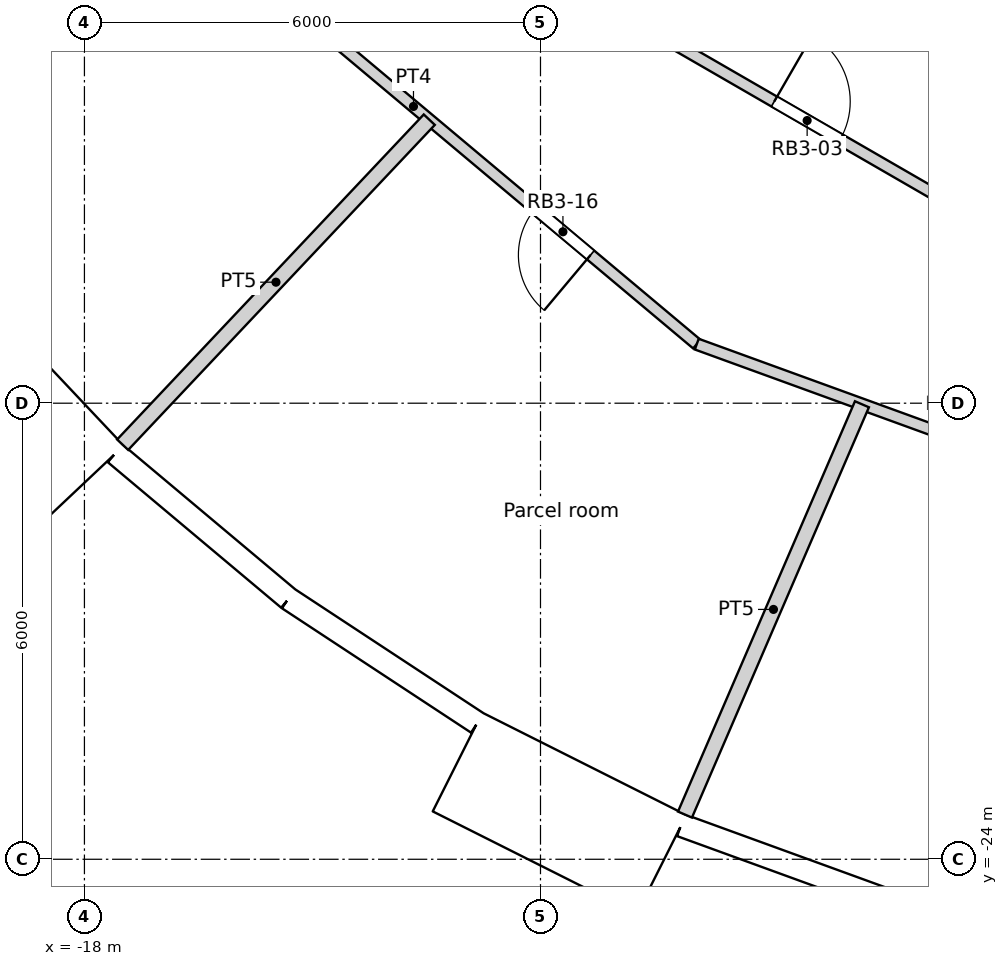
"""IFC4 building model, lengths in metres.
Left out: names, types, materials, properties, quantities, classifications, styles, units other than length and angle.
Written with IfcOpenShell. Run it as: python <this file> out.ifc"""

import sys

from ifc_helpers import new_model, si_unit, direction, frame, frame_2d, origin, origin_2d, place, context, subcontext, project, spatial, rectangle, circle, extrude, element, fill, save


model = new_model("IFC4")
c1 = context("Model", 3, precision=1e-05, world=origin(), true_north=direction((0.0, 1.0)))
c2 = subcontext(c1, "Body", "Model", "MODEL_VIEW")
j1 = project(units=[si_unit("LENGTHUNIT", "METRE"), si_unit("PLANEANGLEUNIT", "RADIAN")], contexts=[c1])
p1 = place(None, origin())
s1 = spatial("IfcSite", under=j1, at=p1, CompositionType="ELEMENT")
p2 = place(p1, origin())
s2 = spatial("IfcBuilding", under=s1, at=p2, CompositionType="ELEMENT")
p3 = place(p2, frame((0.0, 0.0, 147.6)))
s3 = spatial("IfcBuildingStorey", under=s2, at=p3, CompositionType="ELEMENT", Elevation=147.6)
for number, where, z_axis, x_axis in (
    (1, (-16.846, -17.855, 0.0), (0.0, 0.0, 1.0), (1.0, 0.0, 0.0)),
    (2, (-12.274, -21.259, 0.0), (0.0, 0.0, 1.0), (1.0, 0.0, 0.0)),
    (3, (-7.04, -23.516, 0.0), (0.0, 0.0, 1.0), (1.0, 0.0, 0.0)),
):
    element("IfcColumn", number, at=place(p3, frame(where, z_axis=z_axis, x_axis=x_axis)), inside=s3, PredefinedType="COLUMN", context=c2, shape_type="SweptSolid", body=[
        extrude(circle(Radius=0.6, at=origin_2d()), origin(), (0.0, 0.0, 1.0), 3.6),
    ])
for number, where, z_axis, x_axis in (
    (4, (-13.798, -12.802, 0.0), (0.0, 0.0, 1.0), (1.0, 0.0, 0.0)),
    (5, (-9.411, -16.301, 0.0), (0.0, 0.0, 1.0), (1.0, 0.0, 0.0)),
):
    element("IfcColumn", number, at=place(p3, frame(where, z_axis=z_axis, x_axis=x_axis)), inside=s3, PredefinedType="COLUMN", context=c2, shape_type="SweptSolid", body=[
        extrude(circle(Radius=0.65, at=origin_2d()), origin(), (0.0, 0.0, 1.0), 3.6),
    ])
p4 = place(p3, frame((-20.071, -16.874, -0.3), z_axis=(0.0, 0.0, 1.0), x_axis=(0.686217177108, -0.727396718334, 0.0)))
e6 = element("IfcWall", 6, at=p4, inside=s3, PredefinedType="ELEMENTEDWALL", context=c2, shape_type="SweptSolid", body=[
    extrude(rectangle(XDim=3.0, YDim=1.45, at=frame_2d((1.5, 0.0))), origin(), (0.0, 0.0, 1.0), 3.6),
])
p5 = place(p4, frame((1.5, 0.0, 1.85)))
e7 = element("IfcOpeningElement", 7, at=p5, cuts=e6, PredefinedType="OPENING", context=c2, shape_type="SweptSolid", body=[
    extrude(circle(Radius=0.9, at=origin_2d()), frame((0.0, 0.735, 0.0), z_axis=(0.0, -1.0, 0.0), x_axis=(1.0, 0.0, 0.0)), (0.0, 0.0, 1.0), 1.47),
])
p6 = place(p3, frame((-17.593, -18.661, 0.0), z_axis=(0.0, 0.0, 1.0), x_axis=(0.766008913364, -0.642829950023, 0.0)))
e8 = element("IfcWall", 8, at=p6, inside=s3, PredefinedType="SOLIDWALL", context=c2, shape_type="SweptSolid", body=[
    extrude(rectangle(XDim=2.973, YDim=0.3, at=frame_2d((1.486, 0.0))), origin(), (0.0, 0.0, 1.0), 3.3),
])
p7 = place(p6, frame((1.486, 0.0, 1.55)))
e9 = element("IfcOpeningElement", 9, at=p7, cuts=e8, PredefinedType="OPENING", context=c2, shape_type="SweptSolid", body=[
    extrude(circle(Radius=0.9, at=origin_2d()), frame((0.0, 0.16, 0.0), z_axis=(0.0, -1.0, 0.0), x_axis=(1.0, 0.0, 0.0)), (0.0, 0.0, 1.0), 0.32),
])
p8 = place(p3, frame((-15.316, -20.573, 0.0), z_axis=(0.0, 0.0, 1.0), x_axis=(0.835508361394, -0.54947773207, 0.0)))
e10 = element("IfcWall", 10, at=p8, inside=s3, PredefinedType="SOLIDWALL", context=c2, shape_type="SweptSolid", body=[
    extrude(rectangle(XDim=2.973, YDim=0.3, at=frame_2d((1.486, 0.0))), origin(), (0.0, 0.0, 1.0), 3.3),
])
p9 = place(p8, frame((1.486, 0.0, 1.55)))
e11 = element("IfcOpeningElement", 11, at=p9, cuts=e10, PredefinedType="OPENING", context=c2, shape_type="SweptSolid", body=[
    extrude(circle(Radius=0.9, at=origin_2d()), frame((0.0, 0.16, 0.0), z_axis=(0.0, -1.0, 0.0), x_axis=(1.0, 0.0, 0.0)), (0.0, 0.0, 1.0), 0.32),
])
p10 = place(p3, frame((-13.09, -22.721, -0.3), z_axis=(0.0, 0.0, 1.0), x_axis=(0.893628249713, -0.448807922518, 0.0)))
e12 = element("IfcWall", 12, at=p10, inside=s3, PredefinedType="ELEMENTEDWALL", context=c2, shape_type="SweptSolid", body=[
    extrude(rectangle(XDim=3.0, YDim=1.45, at=frame_2d((1.5, 0.0))), origin(), (0.0, 0.0, 1.0), 3.6),
])
p11 = place(p10, frame((1.5, 0.0, 1.85)))
e13 = element("IfcOpeningElement", 13, at=p11, cuts=e12, PredefinedType="OPENING", context=c2, shape_type="SweptSolid", body=[
    extrude(circle(Radius=0.9, at=origin_2d()), frame((0.0, 0.735, 0.0), z_axis=(0.0, -1.0, 0.0), x_axis=(1.0, 0.0, 0.0)), (0.0, 0.0, 1.0), 1.47),
])
p12 = place(p3, frame((-10.149, -23.553, 0.0), z_axis=(0.0, 0.0, 1.0), x_axis=(0.939690282133, -0.342026568652, 0.0)))
e14 = element("IfcWall", 14, at=p12, inside=s3, PredefinedType="SOLIDWALL", context=c2, shape_type="SweptSolid", body=[
    extrude(rectangle(XDim=2.973, YDim=0.3, at=frame_2d((1.486, 0.0))), origin(), (0.0, 0.0, 1.0), 3.3),
])
p13 = place(p12, frame((1.486, 0.0, 1.55)))
e15 = element("IfcOpeningElement", 15, at=p13, cuts=e14, PredefinedType="OPENING", context=c2, shape_type="SweptSolid", body=[
    extrude(circle(Radius=0.9, at=origin_2d()), frame((0.0, 0.16, 0.0), z_axis=(0.0, -1.0, 0.0), x_axis=(1.0, 0.0, 0.0)), (0.0, 0.0, 1.0), 0.32),
])
p14 = place(p3, frame((-15.235, -12.784, 0.0), z_axis=(0.0, 0.0, 1.0), x_axis=(0.766192104565, -0.642611592567, 0.0)))
e16 = element("IfcWall", 16, at=p14, inside=s3, PredefinedType="PARTITIONING", context=c2, shape_type="SweptSolid", body=[
    extrude(rectangle(XDim=6.906, YDim=0.15, at=frame_2d((3.453, 0.0))), origin(), (0.0, 0.0, 1.0), 3.3),
])
p15 = place(p14, frame((4.133, 0.0, 0.0)))
e17 = element("IfcOpeningElement", 17, at=p15, cuts=e16, PredefinedType="OPENING", context=c2, shape_type="SweptSolid", body=[
    extrude(rectangle(XDim=0.95, YDim=2.1, at=frame_2d((0.475, 1.05))), frame((0.0, 0.075, 0.0), z_axis=(0.0, -1.0, 0.0), x_axis=(1.0, 0.0, 0.0)), (0.0, 0.0, 1.0), 0.15),
])
p16 = place(p3, frame((-12.162, -12.162, 0.0), z_axis=(0.0, 0.0, 1.0), x_axis=(0.866004766557, -0.500035743023, 0.0)))
e18 = element("IfcWall", 18, at=p16, inside=s3, PredefinedType="PARTITIONING", context=c2, shape_type="SweptSolid", body=[
    extrude(rectangle(XDim=8.477, YDim=0.15, at=frame_2d((4.239, 0.0))), origin(), (0.0, 0.0, 1.0), 3.3),
])
p17 = place(p16, frame((3.738, 0.0, 0.0)))
e19 = element("IfcOpeningElement", 19, at=p17, cuts=e18, PredefinedType="OPENING", context=c2, shape_type="SweptSolid", body=[
    extrude(rectangle(XDim=1.0, YDim=2.04, at=frame_2d((0.5, 1.02))), frame((0.0, 0.075, 0.0), z_axis=(0.0, -1.0, 0.0), x_axis=(1.0, 0.0, 0.0)), (0.0, 0.0, 1.0), 0.15),
])
p18 = place(p3, frame((-9.944, -17.223, 0.0), z_axis=(0.0, 0.0, 1.0), x_axis=(0.939737689664, -0.341896292208, 0.0)))
e20 = element("IfcWall", 20, at=p18, inside=s3, PredefinedType="PARTITIONING", context=c2, shape_type="SweptSolid", body=[
    extrude(rectangle(XDim=6.908, YDim=0.15, at=frame_2d((3.454, 0.0))), origin(), (0.0, 0.0, 1.0), 3.3),
])
p19 = place(p3, frame((-17.497, -18.546, 0.0), z_axis=(0.0, 0.0, 1.0), x_axis=(0.6862502776, 0.72736549031, 0.0)))
e21 = element("IfcWall", 21, at=p19, inside=s3, PredefinedType="PARTITIONING", context=c2, shape_type="SweptSolid", body=[
    extrude(rectangle(XDim=5.879, YDim=0.2, at=frame_2d((2.939, 0.0))), origin(), (0.0, 0.0, 1.0), 3.3),
])
p20 = place(p3, frame((-10.099, -23.412, 0.0), z_axis=(0.0, 0.0, 1.0), x_axis=(0.39601833725, 0.918242602236, 0.0)))
e22 = element("IfcWall", 22, at=p20, inside=s3, PredefinedType="PARTITIONING", context=c2, shape_type="SweptSolid", body=[
    extrude(rectangle(XDim=5.879, YDim=0.2, at=frame_2d((2.939, 0.0))), origin(), (0.0, 0.0, 1.0), 3.3),
])
p21 = place(p5, origin())
e23 = element("IfcWindow", 23, at=p21, inside=s3, PartitioningType="SINGLE_PANEL", PredefinedType="WINDOW", context=c2, shape_type="SweptSolid", body=[
    extrude(circle(Radius=0.9, at=origin_2d()), frame((0.0, 0.695, 0.0), z_axis=(0.0, -1.0, 0.0), x_axis=(1.0, 0.0, 0.0)), (0.0, 0.0, 1.0), 0.1),
])
fill(e7, e23)
p22 = place(p7, origin())
e24 = element("IfcWindow", 24, at=p22, inside=s3, PartitioningType="SINGLE_PANEL", PredefinedType="WINDOW", context=c2, shape_type="SweptSolid", body=[
    extrude(circle(Radius=0.9, at=origin_2d()), frame((0.0, 0.12, 0.0), z_axis=(0.0, -1.0, 0.0), x_axis=(1.0, 0.0, 0.0)), (0.0, 0.0, 1.0), 0.1),
])
fill(e9, e24)
p23 = place(p9, origin())
e25 = element("IfcWindow", 25, at=p23, inside=s3, PartitioningType="SINGLE_PANEL", PredefinedType="WINDOW", context=c2, shape_type="SweptSolid", body=[
    extrude(circle(Radius=0.9, at=origin_2d()), frame((0.0, 0.12, 0.0), z_axis=(0.0, -1.0, 0.0), x_axis=(1.0, 0.0, 0.0)), (0.0, 0.0, 1.0), 0.1),
])
fill(e11, e25)
p24 = place(p11, origin())
e26 = element("IfcWindow", 26, at=p24, inside=s3, PartitioningType="SINGLE_PANEL", PredefinedType="WINDOW", context=c2, shape_type="SweptSolid", body=[
    extrude(circle(Radius=0.9, at=origin_2d()), frame((0.0, 0.695, 0.0), z_axis=(0.0, -1.0, 0.0), x_axis=(1.0, 0.0, 0.0)), (0.0, 0.0, 1.0), 0.1),
])
fill(e13, e26)
p25 = place(p13, origin())
e27 = element("IfcWindow", 27, at=p25, inside=s3, PartitioningType="SINGLE_PANEL", PredefinedType="WINDOW", context=c2, shape_type="SweptSolid", body=[
    extrude(circle(Radius=0.9, at=origin_2d()), frame((0.0, 0.12, 0.0), z_axis=(0.0, -1.0, 0.0), x_axis=(1.0, 0.0, 0.0)), (0.0, 0.0, 1.0), 0.1),
])
fill(e15, e27)
p26 = place(p17, origin())
e28 = element("IfcDoor", 28, at=p26, inside=s3, OperationType="SINGLE_SWING_LEFT", PredefinedType="DOOR", context=c2, shape_type="SweptSolid", body=[
    extrude(rectangle(XDim=1.0, YDim=2.04, at=frame_2d((0.5, 1.02))), frame((0.0, 0.025, 0.0), z_axis=(0.0, -1.0, 0.0), x_axis=(1.0, 0.0, 0.0)), (0.0, 0.0, 1.0), 0.05),
])
fill(e19, e28)
p27 = place(p15, origin())
e29 = element("IfcDoor", 29, at=p27, inside=s3, OperationType="SINGLE_SWING_LEFT", PredefinedType="DOOR", context=c2, shape_type="SweptSolid", body=[
    extrude(rectangle(XDim=0.95, YDim=2.1, at=frame_2d((0.475, 1.05))), frame((0.0, 0.025, 0.0), z_axis=(0.0, -1.0, 0.0), x_axis=(1.0, 0.0, 0.0)), (0.0, 0.0, 1.0), 0.05),
])
fill(e17, e29)
save(model, sys.argv[1])
